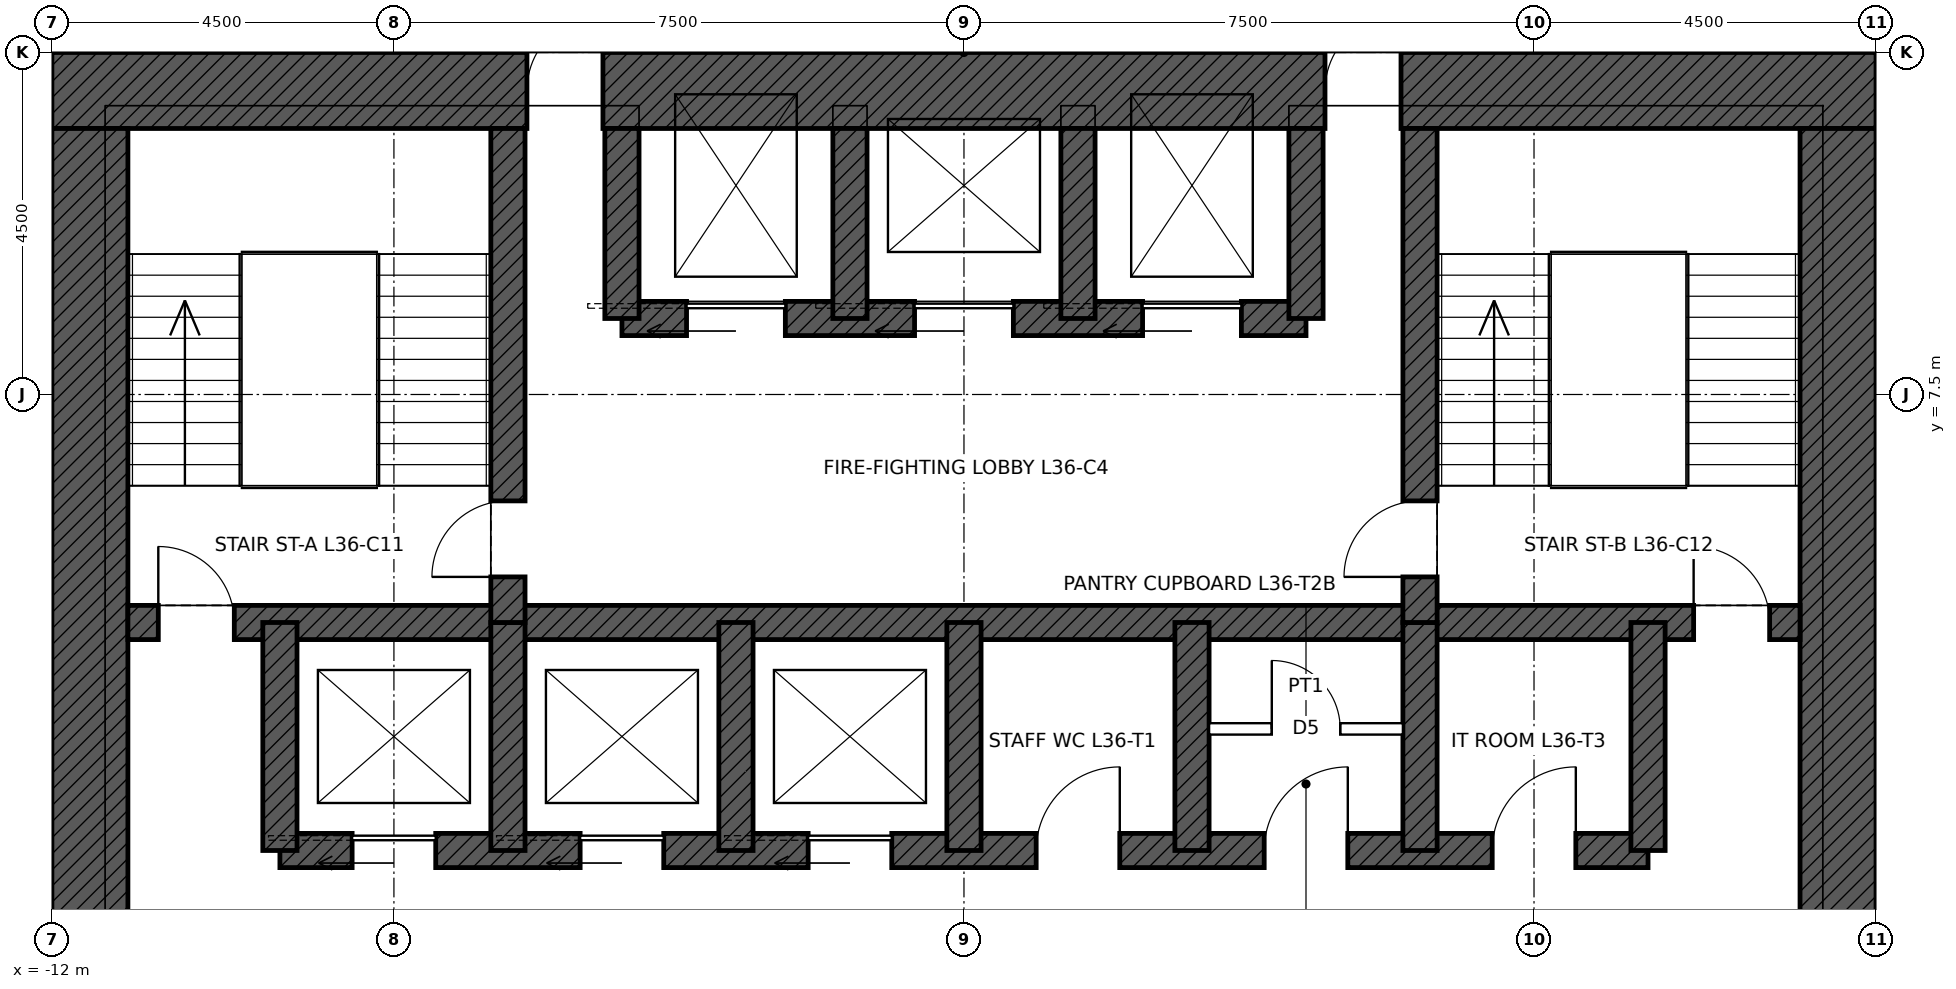
"""IFC4 building model, lengths in metres.
Left out: names, types, materials, properties, quantities, classifications, styles, units other than length and angle.
Written with IfcOpenShell. Run it as: python <this file> out.ifc"""

import sys

from ifc_helpers import new_model, si_unit, direction, frame, frame_2d, origin, place, context, subcontext, project, spatial, rectangle, extrude, element, fill, save


model = new_model("IFC4")
c1 = context("Model", 3, precision=1e-05, world=origin(), true_north=direction((0.0, 1.0)))
c2 = subcontext(c1, "Body", "Model", "MODEL_VIEW")
j1 = project(units=[si_unit("LENGTHUNIT", "METRE"), si_unit("PLANEANGLEUNIT", "RADIAN")], contexts=[c1])
p1 = place(None, origin())
s1 = spatial("IfcSite", under=j1, at=p1, CompositionType="ELEMENT")
p2 = place(p1, origin())
s2 = spatial("IfcBuilding", under=s1, at=p2, CompositionType="ELEMENT")
p3 = place(p2, frame((0.0, 0.0, 177.9)))
s3 = spatial("IfcBuildingStorey", under=s2, at=p3, CompositionType="ELEMENT", Elevation=177.9)
p4 = place(p3, frame((-12.0, 11.5, 0.0), z_axis=(0.0, 0.0, 1.0), x_axis=(1.0, 0.0, 0.0)))
e1 = element("IfcWall", 1, at=p4, inside=s3, PredefinedType="SHEAR", context=c2, shape_type="SweptSolid", body=[
    extrude(rectangle(XDim=24.0, YDim=1.0, at=frame_2d((12.0, 0.0))), origin(), (0.0, 0.0, 1.0), 4.0),
])
p5 = place(p4, frame((6.25, 0.0, 0.0)))
e2 = element("IfcOpeningElement", 2, at=p5, cuts=e1, PredefinedType="OPENING", context=c2, shape_type="SweptSolid", body=[
    extrude(rectangle(XDim=1.0, YDim=2.4, at=frame_2d((0.5, 1.2))), frame((0.0, 0.51, 0.0), z_axis=(0.0, -1.0, 0.0), x_axis=(1.0, 0.0, 0.0)), (0.0, 0.0, 1.0), 1.02),
])
p6 = place(p4, frame((16.75, 0.0, 0.0)))
e3 = element("IfcOpeningElement", 3, at=p6, cuts=e1, PredefinedType="OPENING", context=c2, shape_type="SweptSolid", body=[
    extrude(rectangle(XDim=1.0, YDim=2.4, at=frame_2d((0.5, 1.2))), frame((0.0, 0.51, 0.0), z_axis=(0.0, -1.0, 0.0), x_axis=(1.0, 0.0, 0.0)), (0.0, 0.0, 1.0), 1.02),
])
p7 = place(p3, frame((11.5, 11.0, 0.0), z_axis=(0.0, 0.0, 1.0), x_axis=(0.0, -1.0, 0.0)))
e4 = element("IfcWall", 4, at=p7, inside=s3, PredefinedType="SHEAR", context=c2, shape_type="SweptSolid", body=[
    extrude(rectangle(XDim=22.0, YDim=1.0, at=frame_2d((11.0, 0.0))), origin(), (0.0, 0.0, 1.0), 4.0),
])
p8 = place(p7, frame((10.5, 0.0, 0.0)))
e5 = element("IfcOpeningElement", 5, at=p8, cuts=e4, PredefinedType="OPENING", context=c2, shape_type="SweptSolid", body=[
    extrude(rectangle(XDim=1.0, YDim=2.4, at=frame_2d((0.5, 1.2))), frame((0.0, 0.51, 0.0), z_axis=(0.0, -1.0, 0.0), x_axis=(1.0, 0.0, 0.0)), (0.0, 0.0, 1.0), 1.02),
])
p9 = place(p3, frame((-11.5, -11.0, 0.0), z_axis=(0.0, 0.0, 1.0), x_axis=(0.0, 1.0, 0.0)))
e6 = element("IfcWall", 6, at=p9, inside=s3, PredefinedType="SHEAR", context=c2, shape_type="SweptSolid", body=[
    extrude(rectangle(XDim=22.0, YDim=1.0, at=frame_2d((11.0, 0.0))), origin(), (0.0, 0.0, 1.0), 4.0),
])
p10 = place(p9, frame((10.5, 0.0, 0.0)))
e7 = element("IfcOpeningElement", 7, at=p10, cuts=e6, PredefinedType="OPENING", context=c2, shape_type="SweptSolid", body=[
    extrude(rectangle(XDim=1.0, YDim=2.4, at=frame_2d((0.5, 1.2))), frame((0.0, 0.51, 0.0), z_axis=(0.0, -1.0, 0.0), x_axis=(1.0, 0.0, 0.0)), (0.0, 0.0, 1.0), 1.02),
])
p11 = place(p3, frame((-11.0, 4.5, 0.0), z_axis=(0.0, 0.0, 1.0), x_axis=(1.0, 0.0, 0.0)))
e8 = element("IfcWall", 8, at=p11, inside=s3, PredefinedType="SHEAR", context=c2, shape_type="SweptSolid", body=[
    extrude(rectangle(XDim=22.0, YDim=0.45, at=frame_2d((11.0, 0.0))), origin(), (0.0, 0.0, 1.0), 4.0),
])
p12 = place(p11, frame((0.4, 0.0, 0.0)))
e9 = element("IfcOpeningElement", 9, at=p12, cuts=e8, PredefinedType="OPENING", context=c2, shape_type="SweptSolid", body=[
    extrude(rectangle(XDim=1.0, YDim=2.1, at=frame_2d((0.5, 1.05))), frame((0.0, 0.235, 0.0), z_axis=(0.0, -1.0, 0.0), x_axis=(1.0, 0.0, 0.0)), (0.0, 0.0, 1.0), 0.47),
])
p13 = place(p11, frame((20.6, 0.0, 0.0)))
e10 = element("IfcOpeningElement", 10, at=p13, cuts=e8, PredefinedType="OPENING", context=c2, shape_type="SweptSolid", body=[
    extrude(rectangle(XDim=1.0, YDim=2.1, at=frame_2d((0.5, 1.05))), frame((0.0, 0.235, 0.0), z_axis=(0.0, -1.0, 0.0), x_axis=(1.0, 0.0, 0.0)), (0.0, 0.0, 1.0), 0.47),
])
p14 = place(p3, frame((-9.0, 1.5, 0.0), z_axis=(0.0, 0.0, 1.0), x_axis=(1.0, 0.0, 0.0)))
e11 = element("IfcWall", 11, at=p14, inside=s3, PredefinedType="SHEAR", context=c2, shape_type="SweptSolid", body=[
    extrude(rectangle(XDim=18.0, YDim=0.45, at=frame_2d((9.0, 0.0))), origin(), (0.0, 0.0, 1.0), 4.0),
])
p15 = place(p14, frame((0.95, 0.0, 0.0)))
e12 = element("IfcOpeningElement", 12, at=p15, cuts=e11, PredefinedType="OPENING", context=c2, shape_type="SweptSolid", body=[
    extrude(rectangle(XDim=1.1, YDim=2.1, at=frame_2d((0.55, 1.05))), frame((0.0, 0.235, 0.0), z_axis=(0.0, -1.0, 0.0), x_axis=(1.0, 0.0, 0.0)), (0.0, 0.0, 1.0), 0.47),
])
p16 = place(p14, frame((3.95, 0.0, 0.0)))
e13 = element("IfcOpeningElement", 13, at=p16, cuts=e11, PredefinedType="OPENING", context=c2, shape_type="SweptSolid", body=[
    extrude(rectangle(XDim=1.1, YDim=2.1, at=frame_2d((0.55, 1.05))), frame((0.0, 0.235, 0.0), z_axis=(0.0, -1.0, 0.0), x_axis=(1.0, 0.0, 0.0)), (0.0, 0.0, 1.0), 0.47),
])
p17 = place(p14, frame((6.95, 0.0, 0.0)))
e14 = element("IfcOpeningElement", 14, at=p17, cuts=e11, PredefinedType="OPENING", context=c2, shape_type="SweptSolid", body=[
    extrude(rectangle(XDim=1.1, YDim=2.1, at=frame_2d((0.55, 1.05))), frame((0.0, 0.235, 0.0), z_axis=(0.0, -1.0, 0.0), x_axis=(1.0, 0.0, 0.0)), (0.0, 0.0, 1.0), 0.47),
])
p18 = place(p14, frame((9.95, 0.0, 0.0)))
e15 = element("IfcOpeningElement", 15, at=p18, cuts=e11, PredefinedType="OPENING", context=c2, shape_type="SweptSolid", body=[
    extrude(rectangle(XDim=1.1, YDim=2.1, at=frame_2d((0.55, 1.05))), frame((0.0, 0.235, 0.0), z_axis=(0.0, -1.0, 0.0), x_axis=(1.0, 0.0, 0.0)), (0.0, 0.0, 1.0), 0.47),
])
p19 = place(p14, frame((12.95, 0.0, 0.0)))
e16 = element("IfcOpeningElement", 16, at=p19, cuts=e11, PredefinedType="OPENING", context=c2, shape_type="SweptSolid", body=[
    extrude(rectangle(XDim=1.1, YDim=2.1, at=frame_2d((0.55, 1.05))), frame((0.0, 0.235, 0.0), z_axis=(0.0, -1.0, 0.0), x_axis=(1.0, 0.0, 0.0)), (0.0, 0.0, 1.0), 0.47),
])
p20 = place(p14, frame((15.95, 0.0, 0.0)))
e17 = element("IfcOpeningElement", 17, at=p20, cuts=e11, PredefinedType="OPENING", context=c2, shape_type="SweptSolid", body=[
    extrude(rectangle(XDim=1.1, YDim=2.1, at=frame_2d((0.55, 1.05))), frame((0.0, 0.235, 0.0), z_axis=(0.0, -1.0, 0.0), x_axis=(1.0, 0.0, 0.0)), (0.0, 0.0, 1.0), 0.47),
])
p21 = place(p3, frame((-4.5, 8.5, 0.0), z_axis=(0.0, 0.0, 1.0), x_axis=(1.0, 0.0, 0.0)))
e18 = element("IfcWall", 18, at=p21, inside=s3, PredefinedType="SHEAR", context=c2, shape_type="SweptSolid", body=[
    extrude(rectangle(XDim=9.0, YDim=0.45, at=frame_2d((4.5, 0.0))), origin(), (0.0, 0.0, 1.0), 4.0),
])
p22 = place(p21, frame((0.85, 0.0, 0.0)))
e19 = element("IfcOpeningElement", 19, at=p22, cuts=e18, PredefinedType="OPENING", context=c2, shape_type="SweptSolid", body=[
    extrude(rectangle(XDim=1.3, YDim=2.4, at=frame_2d((0.65, 1.2))), frame((0.0, 0.235, 0.0), z_axis=(0.0, -1.0, 0.0), x_axis=(1.0, 0.0, 0.0)), (0.0, 0.0, 1.0), 0.47),
])
p23 = place(p21, frame((6.85, 0.0, 0.0)))
e20 = element("IfcOpeningElement", 20, at=p23, cuts=e18, PredefinedType="OPENING", context=c2, shape_type="SweptSolid", body=[
    extrude(rectangle(XDim=1.3, YDim=2.4, at=frame_2d((0.65, 1.2))), frame((0.0, 0.235, 0.0), z_axis=(0.0, -1.0, 0.0), x_axis=(1.0, 0.0, 0.0)), (0.0, 0.0, 1.0), 0.47),
])
p24 = place(p21, frame((3.85, 0.0, 0.0)))
e21 = element("IfcOpeningElement", 21, at=p24, cuts=e18, PredefinedType="OPENING", context=c2, shape_type="SweptSolid", body=[
    extrude(rectangle(XDim=1.3, YDim=2.4, at=frame_2d((0.65, 1.2))), frame((0.0, 0.235, 0.0), z_axis=(0.0, -1.0, 0.0), x_axis=(1.0, 0.0, 0.0)), (0.0, 0.0, 1.0), 0.47),
])
for number, where, z_axis, x_axis in (
    (22, (-9.0, 1.5, 0.0), (0.0, 0.0, 1.0), (0.0, 1.0, 0.0)),
    (23, (9.0, 1.5, 0.0), (0.0, 0.0, 1.0), (0.0, 1.0, 0.0)),
    (24, (-6.0, 1.5, 0.0), (0.0, 0.0, 1.0), (0.0, 1.0, 0.0)),
    (25, (-3.0, 1.5, 0.0), (0.0, 0.0, 1.0), (0.0, 1.0, 0.0)),
    (26, (0.0, 1.5, 0.0), (0.0, 0.0, 1.0), (0.0, 1.0, 0.0)),
    (27, (3.0, 1.5, 0.0), (0.0, 0.0, 1.0), (0.0, 1.0, 0.0)),
    (28, (6.0, 1.5, 0.0), (0.0, 0.0, 1.0), (0.0, 1.0, 0.0)),
):
    element("IfcWall", number, at=place(p3, frame(where, z_axis=z_axis, x_axis=x_axis)), inside=s3, PredefinedType="SHEAR", context=c2, shape_type="SweptSolid", body=[
        extrude(rectangle(XDim=3.0, YDim=0.45, at=frame_2d((1.5, 0.0))), origin(), (0.0, 0.0, 1.0), 4.0),
    ])
p25 = place(p3, frame((-6.0, 4.5, 0.0), z_axis=(0.0, 0.0, 1.0), x_axis=(0.0, 1.0, 0.0)))
e29 = element("IfcWall", 29, at=p25, inside=s3, PredefinedType="SHEAR", context=c2, shape_type="SweptSolid", body=[
    extrude(rectangle(XDim=6.5, YDim=0.45, at=frame_2d((3.25, 0.0))), origin(), (0.0, 0.0, 1.0), 4.0),
])
p26 = place(p25, frame((0.6, 0.0, 0.0)))
e30 = element("IfcOpeningElement", 30, at=p26, cuts=e29, PredefinedType="OPENING", context=c2, shape_type="SweptSolid", body=[
    extrude(rectangle(XDim=1.0, YDim=2.1, at=frame_2d((0.5, 1.05))), frame((0.0, 0.235, 0.0), z_axis=(0.0, -1.0, 0.0), x_axis=(1.0, 0.0, 0.0)), (0.0, 0.0, 1.0), 0.47),
])
p27 = place(p3, frame((6.0, 4.5, 0.0), z_axis=(0.0, 0.0, 1.0), x_axis=(0.0, 1.0, 0.0)))
e31 = element("IfcWall", 31, at=p27, inside=s3, PredefinedType="SHEAR", context=c2, shape_type="SweptSolid", body=[
    extrude(rectangle(XDim=6.5, YDim=0.45, at=frame_2d((3.25, 0.0))), origin(), (0.0, 0.0, 1.0), 4.0),
])
p28 = place(p27, frame((0.6, 0.0, 0.0)))
e32 = element("IfcOpeningElement", 32, at=p28, cuts=e31, PredefinedType="OPENING", context=c2, shape_type="SweptSolid", body=[
    extrude(rectangle(XDim=1.0, YDim=2.1, at=frame_2d((0.5, 1.05))), frame((0.0, 0.235, 0.0), z_axis=(0.0, -1.0, 0.0), x_axis=(1.0, 0.0, 0.0)), (0.0, 0.0, 1.0), 0.47),
])
for number, where, z_axis, x_axis in (
    (33, (-4.5, 8.5, 0.0), (0.0, 0.0, 1.0), (0.0, 1.0, 0.0)),
    (34, (4.5, 8.5, 0.0), (0.0, 0.0, 1.0), (0.0, 1.0, 0.0)),
    (35, (-1.5, 8.5, 0.0), (0.0, 0.0, 1.0), (0.0, 1.0, 0.0)),
    (36, (1.5, 8.5, 0.0), (0.0, 0.0, 1.0), (0.0, 1.0, 0.0)),
):
    element("IfcWall", number, at=place(p3, frame(where, z_axis=z_axis, x_axis=x_axis)), inside=s3, PredefinedType="SHEAR", context=c2, shape_type="SweptSolid", body=[
        extrude(rectangle(XDim=2.5, YDim=0.45, at=frame_2d((1.25, 0.0))), origin(), (0.0, 0.0, 1.0), 4.0),
    ])
p29 = place(p3, frame((-13.575, 12.0, 0.0), z_axis=(0.0, 0.0, 1.0), x_axis=(1.0, 0.0, 0.0)))
e37 = element("IfcWall", 37, at=p29, inside=s3, PredefinedType="PARTITIONING", context=c2, shape_type="SweptSolid", body=[
    extrude(rectangle(XDim=1.575, YDim=0.15, at=frame_2d((0.788, 0.0))), origin(), (0.0, 0.0, 1.0), 3.85),
])
p30 = place(p3, frame((3.225, 3.1, 0.0), z_axis=(0.0, 0.0, 1.0), x_axis=(1.0, 0.0, 0.0)))
e38 = element("IfcWall", 38, at=p30, inside=s3, PredefinedType="PARTITIONING", context=c2, shape_type="SweptSolid", body=[
    extrude(rectangle(XDim=2.55, YDim=0.15, at=frame_2d((1.275, 0.0))), origin(), (0.0, 0.0, 1.0), 3.75),
])
p31 = place(p30, frame((0.825, 0.0, 0.0)))
e39 = element("IfcOpeningElement", 39, at=p31, cuts=e38, PredefinedType="OPENING", context=c2, shape_type="SweptSolid", body=[
    extrude(rectangle(XDim=0.9, YDim=2.1, at=frame_2d((0.45, 1.05))), frame((0.0, 0.085, 0.0), z_axis=(0.0, -1.0, 0.0), x_axis=(1.0, 0.0, 0.0)), (0.0, 0.0, 1.0), 0.17),
])
p32 = place(p12, origin())
e40 = element("IfcDoor", 40, at=p32, inside=s3, OperationType="SINGLE_SWING_LEFT", PredefinedType="DOOR", context=c2, shape_type="SweptSolid", body=[
    extrude(rectangle(XDim=1.0, YDim=2.1, at=frame_2d((0.5, 1.05))), frame((0.0, 0.025, 0.0), z_axis=(0.0, -1.0, 0.0), x_axis=(1.0, 0.0, 0.0)), (0.0, 0.0, 1.0), 0.05),
])
fill(e9, e40)
p33 = place(p13, origin())
e41 = element("IfcDoor", 41, at=p33, inside=s3, OperationType="SINGLE_SWING_LEFT", PredefinedType="DOOR", context=c2, shape_type="SweptSolid", body=[
    extrude(rectangle(XDim=1.0, YDim=2.1, at=frame_2d((0.5, 1.05))), frame((0.0, 0.025, 0.0), z_axis=(0.0, -1.0, 0.0), x_axis=(1.0, 0.0, 0.0)), (0.0, 0.0, 1.0), 0.05),
])
fill(e10, e41)
p34 = place(p26, origin())
e42 = element("IfcDoor", 42, at=p34, inside=s3, OperationType="SINGLE_SWING_LEFT", PredefinedType="DOOR", context=c2, shape_type="SweptSolid", body=[
    extrude(rectangle(XDim=1.0, YDim=2.1, at=frame_2d((0.5, 1.05))), frame((0.0, 0.025, 0.0), z_axis=(0.0, -1.0, 0.0), x_axis=(1.0, 0.0, 0.0)), (0.0, 0.0, 1.0), 0.05),
])
fill(e30, e42)
p35 = place(p28, origin())
e43 = element("IfcDoor", 43, at=p35, inside=s3, OperationType="SINGLE_SWING_LEFT", PredefinedType="DOOR", context=c2, shape_type="SweptSolid", body=[
    extrude(rectangle(XDim=1.0, YDim=2.1, at=frame_2d((0.5, 1.05))), frame((0.0, 0.025, 0.0), z_axis=(0.0, -1.0, 0.0), x_axis=(1.0, 0.0, 0.0)), (0.0, 0.0, 1.0), 0.05),
])
fill(e32, e43)
p36 = place(p5, origin())
e44 = element("IfcDoor", 44, at=p36, inside=s3, OperationType="SINGLE_SWING_RIGHT", PredefinedType="DOOR", context=c2, shape_type="SweptSolid", body=[
    extrude(rectangle(XDim=1.0, YDim=2.4, at=frame_2d((0.5, 1.2))), frame((0.0, 0.485, 0.0), z_axis=(0.0, -1.0, 0.0), x_axis=(1.0, 0.0, 0.0)), (0.0, 0.0, 1.0), 0.05),
])
fill(e2, e44)
p37 = place(p6, origin())
e45 = element("IfcDoor", 45, at=p37, inside=s3, OperationType="SINGLE_SWING_RIGHT", PredefinedType="DOOR", context=c2, shape_type="SweptSolid", body=[
    extrude(rectangle(XDim=1.0, YDim=2.4, at=frame_2d((0.5, 1.2))), frame((0.0, 0.485, 0.0), z_axis=(0.0, -1.0, 0.0), x_axis=(1.0, 0.0, 0.0)), (0.0, 0.0, 1.0), 0.05),
])
fill(e3, e45)
p38 = place(p22, origin())
e46 = element("IfcDoor", 46, at=p38, inside=s3, OperationType="SLIDING_TO_LEFT", PredefinedType="DOOR", context=c2, shape_type="SweptSolid", body=[
    extrude(rectangle(XDim=1.3, YDim=2.4, at=frame_2d((0.65, 1.2))), frame((0.0, 0.025, 0.0), z_axis=(0.0, -1.0, 0.0), x_axis=(1.0, 0.0, 0.0)), (0.0, 0.0, 1.0), 0.05),
])
fill(e19, e46)
p39 = place(p23, origin())
e47 = element("IfcDoor", 47, at=p39, inside=s3, OperationType="SLIDING_TO_LEFT", PredefinedType="DOOR", context=c2, shape_type="SweptSolid", body=[
    extrude(rectangle(XDim=1.3, YDim=2.4, at=frame_2d((0.65, 1.2))), frame((0.0, 0.025, 0.0), z_axis=(0.0, -1.0, 0.0), x_axis=(1.0, 0.0, 0.0)), (0.0, 0.0, 1.0), 0.05),
])
fill(e20, e47)
p40 = place(p24, origin())
e48 = element("IfcDoor", 48, at=p40, inside=s3, OperationType="SLIDING_TO_LEFT", PredefinedType="DOOR", context=c2, shape_type="SweptSolid", body=[
    extrude(rectangle(XDim=1.3, YDim=2.4, at=frame_2d((0.65, 1.2))), frame((0.0, 0.025, 0.0), z_axis=(0.0, -1.0, 0.0), x_axis=(1.0, 0.0, 0.0)), (0.0, 0.0, 1.0), 0.05),
])
fill(e21, e48)
p41 = place(p15, origin())
e49 = element("IfcDoor", 49, at=p41, inside=s3, OperationType="SLIDING_TO_LEFT", PredefinedType="DOOR", context=c2, shape_type="SweptSolid", body=[
    extrude(rectangle(XDim=1.1, YDim=2.1, at=frame_2d((0.55, 1.05))), frame((0.0, 0.025, 0.0), z_axis=(0.0, -1.0, 0.0), x_axis=(1.0, 0.0, 0.0)), (0.0, 0.0, 1.0), 0.05),
])
fill(e12, e49)
p42 = place(p16, origin())
e50 = element("IfcDoor", 50, at=p42, inside=s3, OperationType="SLIDING_TO_LEFT", PredefinedType="DOOR", context=c2, shape_type="SweptSolid", body=[
    extrude(rectangle(XDim=1.1, YDim=2.1, at=frame_2d((0.55, 1.05))), frame((0.0, 0.025, 0.0), z_axis=(0.0, -1.0, 0.0), x_axis=(1.0, 0.0, 0.0)), (0.0, 0.0, 1.0), 0.05),
])
fill(e13, e50)
p43 = place(p17, origin())
e51 = element("IfcDoor", 51, at=p43, inside=s3, OperationType="SLIDING_TO_LEFT", PredefinedType="DOOR", context=c2, shape_type="SweptSolid", body=[
    extrude(rectangle(XDim=1.1, YDim=2.1, at=frame_2d((0.55, 1.05))), frame((0.0, 0.025, 0.0), z_axis=(0.0, -1.0, 0.0), x_axis=(1.0, 0.0, 0.0)), (0.0, 0.0, 1.0), 0.05),
])
fill(e14, e51)
p44 = place(p18, origin())
e52 = element("IfcDoor", 52, at=p44, inside=s3, OperationType="SINGLE_SWING_RIGHT", PredefinedType="DOOR", context=c2, shape_type="SweptSolid", body=[
    extrude(rectangle(XDim=1.1, YDim=2.1, at=frame_2d((0.55, 1.05))), frame((0.0, 0.025, 0.0), z_axis=(0.0, -1.0, 0.0), x_axis=(1.0, 0.0, 0.0)), (0.0, 0.0, 1.0), 0.05),
])
fill(e15, e52)
p45 = place(p19, origin())
e53 = element("IfcDoor", 53, at=p45, inside=s3, OperationType="SINGLE_SWING_RIGHT", PredefinedType="DOOR", context=c2, shape_type="SweptSolid", body=[
    extrude(rectangle(XDim=1.1, YDim=2.1, at=frame_2d((0.55, 1.05))), frame((0.0, 0.025, 0.0), z_axis=(0.0, -1.0, 0.0), x_axis=(1.0, 0.0, 0.0)), (0.0, 0.0, 1.0), 0.05),
])
fill(e16, e53)
p46 = place(p31, origin())
e54 = element("IfcDoor", 54, at=p46, inside=s3, OperationType="SINGLE_SWING_LEFT", PredefinedType="DOOR", context=c2, shape_type="SweptSolid", body=[
    extrude(rectangle(XDim=0.9, YDim=2.1, at=frame_2d((0.45, 1.05))), frame((0.0, 0.025, 0.0), z_axis=(0.0, -1.0, 0.0), x_axis=(1.0, 0.0, 0.0)), (0.0, 0.0, 1.0), 0.05),
])
fill(e39, e54)
p47 = place(p20, origin())
e55 = element("IfcDoor", 55, at=p47, inside=s3, OperationType="SINGLE_SWING_RIGHT", PredefinedType="DOOR", context=c2, shape_type="SweptSolid", body=[
    extrude(rectangle(XDim=1.1, YDim=2.1, at=frame_2d((0.55, 1.05))), frame((0.0, 0.025, 0.0), z_axis=(0.0, -1.0, 0.0), x_axis=(1.0, 0.0, 0.0)), (0.0, 0.0, 1.0), 0.05),
])
fill(e17, e55)
save(model, sys.argv[1])
